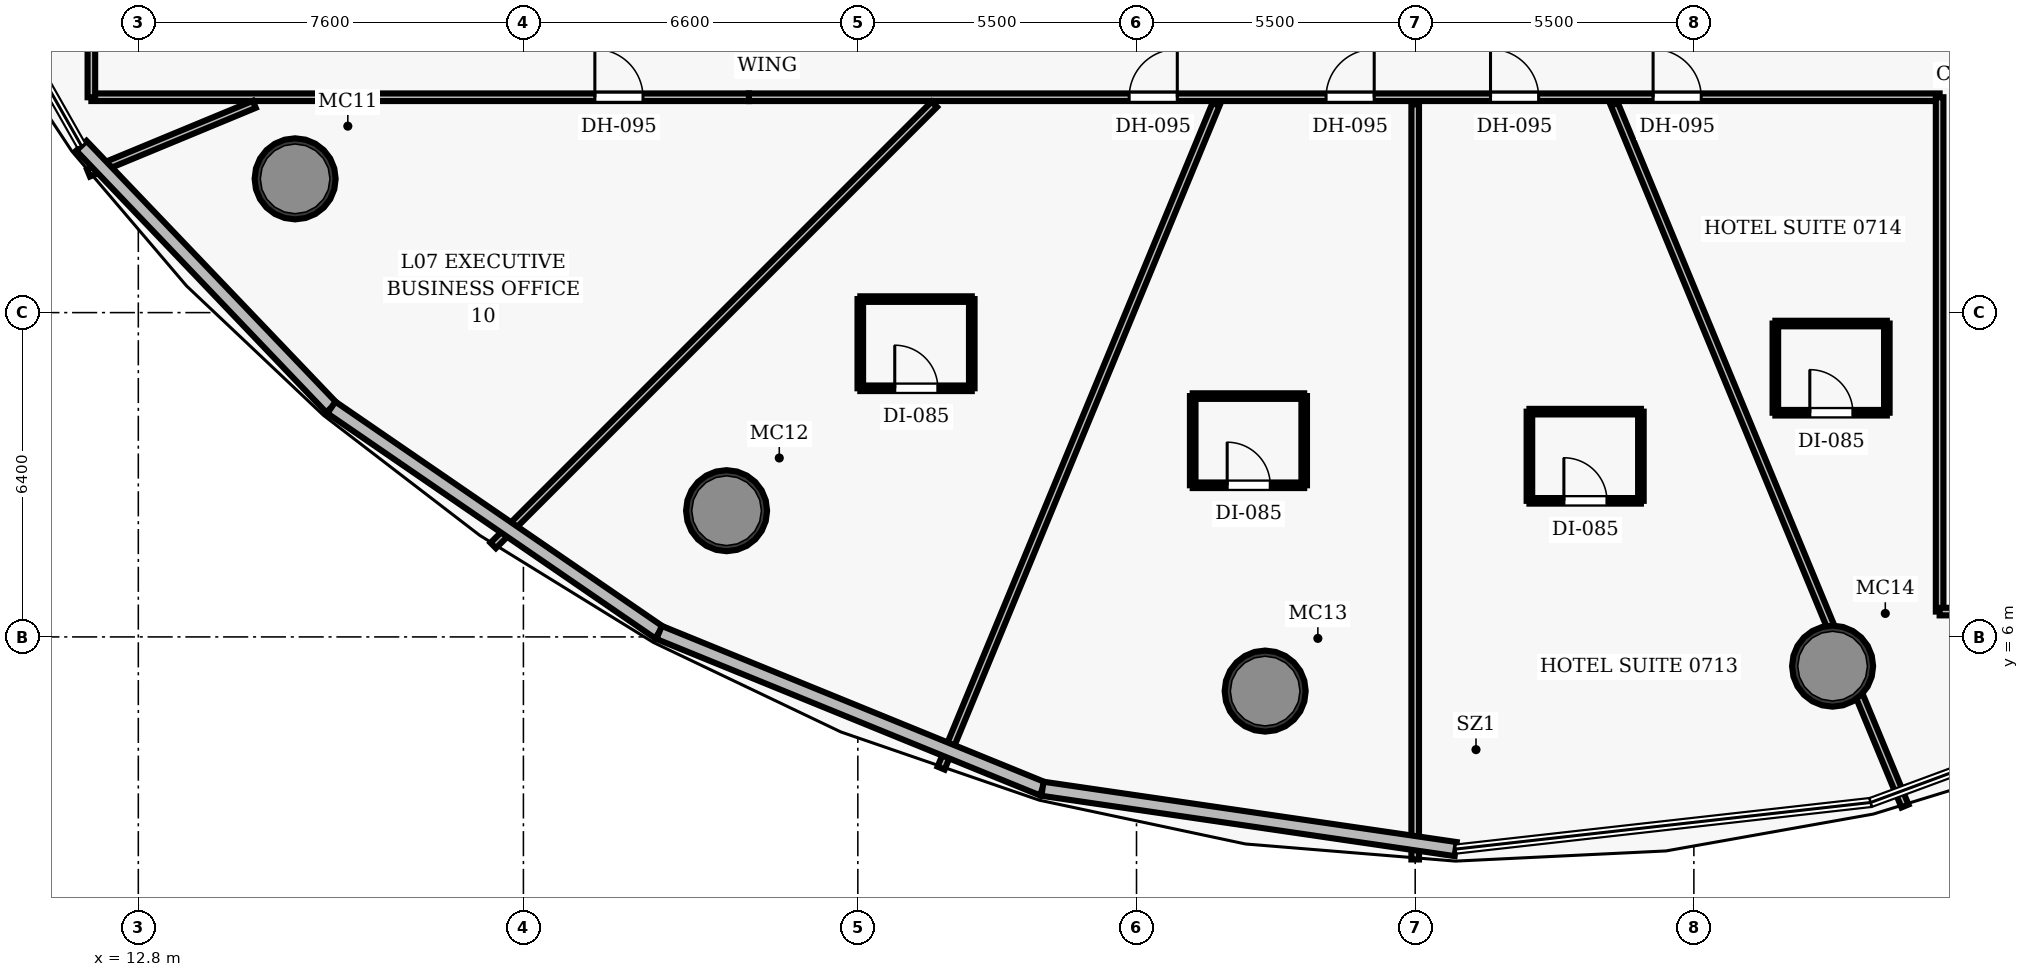
"""IFC4 building model, lengths in metres.
Left out: names, types, materials, properties, quantities, classifications, styles, units other than length and angle.
Written with IfcOpenShell. Run it as: python <this file> out.ifc"""

import sys

from ifc_helpers import new_model, si_unit, direction, frame, frame_2d, origin, origin_2d, place, context, subcontext, project, spatial, rectangle, hollow_circle, extrude, element, fill, save


model = new_model("IFC4")
c1 = context("Model", 3, precision=1e-05, world=origin(), true_north=direction((0.0, 1.0)))
c2 = subcontext(c1, "Body", "Model", "MODEL_VIEW")
j1 = project(units=[si_unit("LENGTHUNIT", "METRE"), si_unit("PLANEANGLEUNIT", "RADIAN")], contexts=[c1])
p1 = place(None, origin())
s1 = spatial("IfcSite", under=j1, at=p1, CompositionType="ELEMENT")
p2 = place(p1, origin())
s2 = spatial("IfcBuilding", under=s1, at=p2, CompositionType="ELEMENT")
p3 = place(p2, frame((0.0, 0.0, 41.4)))
s3 = spatial("IfcBuildingStorey", under=s2, at=p3, CompositionType="ELEMENT", Elevation=41.4)
for number, where, z_axis, x_axis in (
    (1, (15.895, 15.04, 0.0), (0.0, 0.0, 1.0), (1.0, 0.0, 0.0)),
    (2, (24.41, 8.491, 0.0), (0.0, 0.0, 1.0), (1.0, 0.0, 0.0)),
    (3, (35.039, 4.931, 0.0), (0.0, 0.0, 1.0), (1.0, 0.0, 0.0)),
    (4, (46.238, 5.423, 0.0), (0.0, 0.0, 1.0), (1.0, 0.0, 0.0)),
):
    element("IfcColumn", number, at=place(p3, frame(where, z_axis=z_axis, x_axis=x_axis)), inside=s3, PredefinedType="COLUMN", context=c2, shape_type="SweptSolid", body=[
        extrude(hollow_circle(Radius=0.8, WallThickness=0.06, at=origin_2d()), origin(), (0.0, 0.0, 1.0), 3.5),
    ])
p4 = place(p3, frame((24.85, 16.65, 0.0), z_axis=(0.0, 0.0, 1.0), x_axis=(1.0, 0.0, 0.0)))
e5 = element("IfcWall", 5, at=p4, inside=s3, PredefinedType="PARTITIONING", context=c2, shape_type="SweptSolid", body=[
    extrude(rectangle(XDim=23.5, YDim=0.15, at=frame_2d((11.75, 0.0))), origin(), (0.0, 0.0, 1.0), 2.6),
])
p5 = place(p4, frame((7.505, 0.0, 0.0)))
e6 = element("IfcOpeningElement", 6, at=p5, cuts=e5, PredefinedType="OPENING", context=c2, shape_type="SweptSolid", body=[
    extrude(rectangle(XDim=0.95, YDim=2.15, at=frame_2d((0.475, 1.075))), frame((0.0, 0.085, 0.0), z_axis=(0.0, -1.0, 0.0), x_axis=(1.0, 0.0, 0.0)), (0.0, 0.0, 1.0), 0.17),
])
p6 = place(p4, frame((11.391, 0.0, 0.0)))
e7 = element("IfcOpeningElement", 7, at=p6, cuts=e5, PredefinedType="OPENING", context=c2, shape_type="SweptSolid", body=[
    extrude(rectangle(XDim=0.95, YDim=2.15, at=frame_2d((0.475, 1.075))), frame((0.0, 0.085, 0.0), z_axis=(0.0, -1.0, 0.0), x_axis=(1.0, 0.0, 0.0)), (0.0, 0.0, 1.0), 0.17),
])
p7 = place(p4, frame((14.636, 0.0, 0.0)))
e8 = element("IfcOpeningElement", 8, at=p7, cuts=e5, PredefinedType="OPENING", context=c2, shape_type="SweptSolid", body=[
    extrude(rectangle(XDim=0.95, YDim=2.15, at=frame_2d((0.475, 1.075))), frame((0.0, 0.085, 0.0), z_axis=(0.0, -1.0, 0.0), x_axis=(1.0, 0.0, 0.0)), (0.0, 0.0, 1.0), 0.17),
])
p8 = place(p4, frame((17.845, 0.0, 0.0)))
e9 = element("IfcOpeningElement", 9, at=p8, cuts=e5, PredefinedType="OPENING", context=c2, shape_type="SweptSolid", body=[
    extrude(rectangle(XDim=0.95, YDim=2.15, at=frame_2d((0.475, 1.075))), frame((0.0, 0.085, 0.0), z_axis=(0.0, -1.0, 0.0), x_axis=(1.0, 0.0, 0.0)), (0.0, 0.0, 1.0), 0.17),
])
p9 = place(p3, frame((11.874, 16.65, 0.0), z_axis=(0.0, 0.0, 1.0), x_axis=(1.0, 0.0, 0.0)))
e10 = element("IfcWall", 10, at=p9, inside=s3, PredefinedType="PARTITIONING", context=c2, shape_type="SweptSolid", body=[
    extrude(rectangle(XDim=12.977, YDim=0.15, at=frame_2d((6.488, 0.0))), origin(), (0.0, 0.0, 1.0), 2.6),
])
p10 = place(p9, frame((9.937, 0.0, 0.0)))
e11 = element("IfcOpeningElement", 11, at=p10, cuts=e10, PredefinedType="OPENING", context=c2, shape_type="SweptSolid", body=[
    extrude(rectangle(XDim=0.95, YDim=2.15, at=frame_2d((0.475, 1.075))), frame((0.0, 0.085, 0.0), z_axis=(0.0, -1.0, 0.0), x_axis=(1.0, 0.0, 0.0)), (0.0, 0.0, 1.0), 0.17),
])
p11 = place(p3, frame((11.874, 16.65, 0.0), z_axis=(0.0, 0.0, 1.0), x_axis=(0.0, 1.0, 0.0)))
e12 = element("IfcWall", 12, at=p11, inside=s3, PredefinedType="PARTITIONING", context=c2, shape_type="SweptSolid", body=[
    extrude(rectangle(XDim=2.8, YDim=0.15, at=frame_2d((1.4, 0.0))), origin(), (0.0, 0.0, 1.0), 2.6),
])
p12 = place(p3, frame((48.35, 6.5, 0.0), z_axis=(0.0, 0.0, 1.0), x_axis=(0.0, 1.0, 0.0)))
e13 = element("IfcWall", 13, at=p12, inside=s3, PredefinedType="PARTITIONING", context=c2, shape_type="SweptSolid", body=[
    extrude(rectangle(XDim=10.15, YDim=0.15, at=frame_2d((5.075, 0.0))), origin(), (0.0, 0.0, 1.0), 2.6),
])
p13 = place(p3, frame((48.35, 6.5, 0.0), z_axis=(0.0, 0.0, 1.0), x_axis=(1.0, 0.0, 0.0)))
e14 = element("IfcWall", 14, at=p13, inside=s3, PredefinedType="PARTITIONING", context=c2, shape_type="SweptSolid", body=[
    extrude(rectangle(XDim=2.8, YDim=0.15, at=frame_2d((1.4, 0.0))), origin(), (0.0, 0.0, 1.0), 2.6),
])
p14 = place(p3, frame((15.089, 16.51, 0.0), z_axis=(0.0, 0.0, 1.0), x_axis=(-0.923882422403, -0.382676455475, 0.0)))
e15 = element("IfcWall", 15, at=p14, inside=s3, PredefinedType="PARTITIONING", context=c2, shape_type="SweptSolid", body=[
    extrude(rectangle(XDim=3.542, YDim=0.15, at=frame_2d((1.771, 0.0))), origin(), (0.0, 0.0, 1.0), 2.6),
])
p15 = place(p3, frame((28.51, 16.51, 0.0), z_axis=(0.0, 0.0, 1.0), x_axis=(-0.707106781187, -0.707106781187, 0.0)))
e16 = element("IfcWall", 16, at=p15, inside=s3, PredefinedType="PARTITIONING", context=c2, shape_type="SweptSolid", body=[
    extrude(rectangle(XDim=12.312, YDim=0.15, at=frame_2d((6.156, 0.0))), origin(), (0.0, 0.0, 1.0), 2.6),
])
p16 = place(p3, frame((34.069, 16.51, 0.0), z_axis=(0.0, 0.0, 1.0), x_axis=(-0.3826802801, -0.923880838216, 0.0)))
e17 = element("IfcWall", 17, at=p16, inside=s3, PredefinedType="PARTITIONING", context=c2, shape_type="SweptSolid", body=[
    extrude(rectangle(XDim=14.178, YDim=0.15, at=frame_2d((7.089, 0.0))), origin(), (0.0, 0.0, 1.0), 2.6),
])
p17 = place(p3, frame((38.0, 16.51, 0.0), z_axis=(0.0, 0.0, 1.0), x_axis=(0.0, -1.0, 0.0)))
e18 = element("IfcWall", 18, at=p17, inside=s3, PredefinedType="PARTITIONING", context=c2, shape_type="SweptSolid", body=[
    extrude(rectangle(XDim=14.902, YDim=0.15, at=frame_2d((7.451, 0.0))), origin(), (0.0, 0.0, 1.0), 2.6),
])
p18 = place(p3, frame((41.931, 16.51, 0.0), z_axis=(0.0, 0.0, 1.0), x_axis=(0.382684118973, -0.923879248109, 0.0)))
e19 = element("IfcWall", 19, at=p18, inside=s3, PredefinedType="PARTITIONING", context=c2, shape_type="SweptSolid", body=[
    extrude(rectangle(XDim=14.988, YDim=0.15, at=frame_2d((7.494, 0.0))), origin(), (0.0, 0.0, 1.0), 2.6),
])
p19 = place(p3, frame((27.049, 10.907, 0.0), z_axis=(0.0, 0.0, 1.0), x_axis=(1.0, 0.0, 0.0)))
e20 = element("IfcWall", 20, at=p19, inside=s3, PredefinedType="PARTITIONING", context=c2, shape_type="SweptSolid", body=[
    extrude(rectangle(XDim=2.2, YDim=0.11, at=frame_2d((1.1, 0.0))), origin(), (0.0, 0.0, 1.0), 2.6),
])
p20 = place(p19, frame((0.68, 0.0, 0.0)))
e21 = element("IfcOpeningElement", 21, at=p20, cuts=e20, PredefinedType="OPENING", context=c2, shape_type="SweptSolid", body=[
    extrude(rectangle(XDim=0.85, YDim=2.1, at=frame_2d((0.425, 1.05))), frame((0.0, 0.065, 0.0), z_axis=(0.0, -1.0, 0.0), x_axis=(1.0, 0.0, 0.0)), (0.0, 0.0, 1.0), 0.13),
])
p21 = place(p3, frame((27.049, 12.667, 0.0), z_axis=(0.0, 0.0, 1.0), x_axis=(1.0, 0.0, 0.0)))
e22 = element("IfcWall", 22, at=p21, inside=s3, PredefinedType="PARTITIONING", context=c2, shape_type="SweptSolid", body=[
    extrude(rectangle(XDim=2.2, YDim=0.11, at=frame_2d((1.1, 0.0))), origin(), (0.0, 0.0, 1.0), 2.6),
])
for number, where, z_axis, x_axis in (
    (23, (27.049, 10.907, 0.0), (0.0, 0.0, 1.0), (0.0, 1.0, 0.0)),
    (24, (29.249, 10.907, 0.0), (0.0, 0.0, 1.0), (0.0, 1.0, 0.0)),
):
    element("IfcWall", number, at=place(p3, frame(where, z_axis=z_axis, x_axis=x_axis)), inside=s3, PredefinedType="PARTITIONING", context=c2, shape_type="SweptSolid", body=[
        extrude(rectangle(XDim=1.76, YDim=0.11, at=frame_2d((0.88, 0.0))), origin(), (0.0, 0.0, 1.0), 2.6),
    ])
p22 = place(p3, frame((33.609, 8.993, 0.0), z_axis=(0.0, 0.0, 1.0), x_axis=(1.0, 0.0, 0.0)))
e25 = element("IfcWall", 25, at=p22, inside=s3, PredefinedType="PARTITIONING", context=c2, shape_type="SweptSolid", body=[
    extrude(rectangle(XDim=2.2, YDim=0.11, at=frame_2d((1.1, 0.0))), origin(), (0.0, 0.0, 1.0), 2.6),
])
p23 = place(p22, frame((0.68, 0.0, 0.0)))
e26 = element("IfcOpeningElement", 26, at=p23, cuts=e25, PredefinedType="OPENING", context=c2, shape_type="SweptSolid", body=[
    extrude(rectangle(XDim=0.85, YDim=2.1, at=frame_2d((0.425, 1.05))), frame((0.0, 0.065, 0.0), z_axis=(0.0, -1.0, 0.0), x_axis=(1.0, 0.0, 0.0)), (0.0, 0.0, 1.0), 0.13),
])
p24 = place(p3, frame((33.609, 10.753, 0.0), z_axis=(0.0, 0.0, 1.0), x_axis=(1.0, 0.0, 0.0)))
e27 = element("IfcWall", 27, at=p24, inside=s3, PredefinedType="PARTITIONING", context=c2, shape_type="SweptSolid", body=[
    extrude(rectangle(XDim=2.2, YDim=0.11, at=frame_2d((1.1, 0.0))), origin(), (0.0, 0.0, 1.0), 2.6),
])
for number, where, z_axis, x_axis in (
    (28, (33.609, 8.993, 0.0), (0.0, 0.0, 1.0), (0.0, 1.0, 0.0)),
    (29, (35.809, 8.993, 0.0), (0.0, 0.0, 1.0), (0.0, 1.0, 0.0)),
):
    element("IfcWall", number, at=place(p3, frame(where, z_axis=z_axis, x_axis=x_axis)), inside=s3, PredefinedType="PARTITIONING", context=c2, shape_type="SweptSolid", body=[
        extrude(rectangle(XDim=1.76, YDim=0.11, at=frame_2d((0.88, 0.0))), origin(), (0.0, 0.0, 1.0), 2.6),
    ])
p25 = place(p3, frame((40.254, 8.685, 0.0), z_axis=(0.0, 0.0, 1.0), x_axis=(1.0, 0.0, 0.0)))
e30 = element("IfcWall", 30, at=p25, inside=s3, PredefinedType="PARTITIONING", context=c2, shape_type="SweptSolid", body=[
    extrude(rectangle(XDim=2.2, YDim=0.11, at=frame_2d((1.1, 0.0))), origin(), (0.0, 0.0, 1.0), 2.6),
])
p26 = place(p25, frame((0.68, 0.0, 0.0)))
e31 = element("IfcOpeningElement", 31, at=p26, cuts=e30, PredefinedType="OPENING", context=c2, shape_type="SweptSolid", body=[
    extrude(rectangle(XDim=0.85, YDim=2.1, at=frame_2d((0.425, 1.05))), frame((0.0, 0.065, 0.0), z_axis=(0.0, -1.0, 0.0), x_axis=(1.0, 0.0, 0.0)), (0.0, 0.0, 1.0), 0.13),
])
p27 = place(p3, frame((40.254, 10.445, 0.0), z_axis=(0.0, 0.0, 1.0), x_axis=(1.0, 0.0, 0.0)))
e32 = element("IfcWall", 32, at=p27, inside=s3, PredefinedType="PARTITIONING", context=c2, shape_type="SweptSolid", body=[
    extrude(rectangle(XDim=2.2, YDim=0.11, at=frame_2d((1.1, 0.0))), origin(), (0.0, 0.0, 1.0), 2.6),
])
for number, where, z_axis, x_axis in (
    (33, (40.254, 8.685, 0.0), (0.0, 0.0, 1.0), (0.0, 1.0, 0.0)),
    (34, (42.454, 8.685, 0.0), (0.0, 0.0, 1.0), (0.0, 1.0, 0.0)),
):
    element("IfcWall", number, at=place(p3, frame(where, z_axis=z_axis, x_axis=x_axis)), inside=s3, PredefinedType="PARTITIONING", context=c2, shape_type="SweptSolid", body=[
        extrude(rectangle(XDim=1.76, YDim=0.11, at=frame_2d((0.88, 0.0))), origin(), (0.0, 0.0, 1.0), 2.6),
    ])
p28 = place(p3, frame((45.108, 10.424, 0.0), z_axis=(0.0, 0.0, 1.0), x_axis=(1.0, 0.0, 0.0)))
e35 = element("IfcWall", 35, at=p28, inside=s3, PredefinedType="PARTITIONING", context=c2, shape_type="SweptSolid", body=[
    extrude(rectangle(XDim=2.2, YDim=0.11, at=frame_2d((1.1, 0.0))), origin(), (0.0, 0.0, 1.0), 2.6),
])
p29 = place(p28, frame((0.68, 0.0, 0.0)))
e36 = element("IfcOpeningElement", 36, at=p29, cuts=e35, PredefinedType="OPENING", context=c2, shape_type="SweptSolid", body=[
    extrude(rectangle(XDim=0.85, YDim=2.1, at=frame_2d((0.425, 1.05))), frame((0.0, 0.065, 0.0), z_axis=(0.0, -1.0, 0.0), x_axis=(1.0, 0.0, 0.0)), (0.0, 0.0, 1.0), 0.13),
])
p30 = place(p3, frame((45.108, 12.184, 0.0), z_axis=(0.0, 0.0, 1.0), x_axis=(1.0, 0.0, 0.0)))
e37 = element("IfcWall", 37, at=p30, inside=s3, PredefinedType="PARTITIONING", context=c2, shape_type="SweptSolid", body=[
    extrude(rectangle(XDim=2.2, YDim=0.11, at=frame_2d((1.1, 0.0))), origin(), (0.0, 0.0, 1.0), 2.6),
])
for number, where, z_axis, x_axis in (
    (38, (45.108, 10.424, 0.0), (0.0, 0.0, 1.0), (0.0, 1.0, 0.0)),
    (39, (47.308, 10.424, 0.0), (0.0, 0.0, 1.0), (0.0, 1.0, 0.0)),
):
    element("IfcWall", number, at=place(p3, frame(where, z_axis=z_axis, x_axis=x_axis)), inside=s3, PredefinedType="PARTITIONING", context=c2, shape_type="SweptSolid", body=[
        extrude(rectangle(XDim=1.76, YDim=0.11, at=frame_2d((0.88, 0.0))), origin(), (0.0, 0.0, 1.0), 2.6),
    ])
p31 = place(p3, frame((16.61, 10.528, 0.0), z_axis=(0.0, 0.0, 1.0), x_axis=(-0.690719589941, 0.723122706096, 0.0)))
e40 = element("IfcWall", 40, at=p31, inside=s3, PredefinedType="SOLIDWALL", context=c2, shape_type="SweptSolid", body=[
    extrude(rectangle(XDim=7.143, YDim=0.28, at=frame_2d((3.571, 0.0))), origin(), (0.0, 0.0, 1.0), 3.25),
])
p32 = place(p3, frame((23.078, 6.088, 0.0), z_axis=(0.0, 0.0, 1.0), x_axis=(-0.824452139249, 0.565931683234, 0.0)))
e41 = element("IfcWall", 41, at=p32, inside=s3, PredefinedType="SOLIDWALL", context=c2, shape_type="SweptSolid", body=[
    extrude(rectangle(XDim=7.845, YDim=0.28, at=frame_2d((3.922, 0.0))), origin(), (0.0, 0.0, 1.0), 3.25),
])
p33 = place(p3, frame((30.644, 3.004, 0.0), z_axis=(0.0, 0.0, 1.0), x_axis=(-0.926023129378, 0.377466771858, 0.0)))
e42 = element("IfcWall", 42, at=p33, inside=s3, PredefinedType="SOLIDWALL", context=c2, shape_type="SweptSolid", body=[
    extrude(rectangle(XDim=8.171, YDim=0.28, at=frame_2d((4.085, 0.0))), origin(), (0.0, 0.0, 1.0), 3.25),
])
p34 = place(p3, frame((38.799, 1.813, 0.0), z_axis=(0.0, 0.0, 1.0), x_axis=(-0.989508113773, 0.14447730887, 0.0)))
e43 = element("IfcWall", 43, at=p34, inside=s3, PredefinedType="SOLIDWALL", context=c2, shape_type="SweptSolid", body=[
    extrude(rectangle(XDim=8.241, YDim=0.28, at=frame_2d((4.121, 0.0))), origin(), (0.0, 0.0, 1.0), 3.25),
])
p35 = place(p10, origin())
e44 = element("IfcDoor", 44, at=p35, inside=s3, OperationType="SINGLE_SWING_LEFT", PredefinedType="DOOR", context=c2, shape_type="SweptSolid", body=[
    extrude(rectangle(XDim=0.95, YDim=2.15, at=frame_2d((0.475, 1.075))), frame((0.0, 0.025, 0.0), z_axis=(0.0, -1.0, 0.0), x_axis=(1.0, 0.0, 0.0)), (0.0, 0.0, 1.0), 0.05),
])
fill(e11, e44)
p36 = place(p5, origin())
e45 = element("IfcDoor", 45, at=p36, inside=s3, OperationType="SINGLE_SWING_RIGHT", PredefinedType="DOOR", context=c2, shape_type="SweptSolid", body=[
    extrude(rectangle(XDim=0.95, YDim=2.15, at=frame_2d((0.475, 1.075))), frame((0.0, 0.025, 0.0), z_axis=(0.0, -1.0, 0.0), x_axis=(1.0, 0.0, 0.0)), (0.0, 0.0, 1.0), 0.05),
])
fill(e6, e45)
p37 = place(p20, origin())
e46 = element("IfcDoor", 46, at=p37, inside=s3, OperationType="SINGLE_SWING_LEFT", PredefinedType="DOOR", context=c2, shape_type="SweptSolid", body=[
    extrude(rectangle(XDim=0.85, YDim=2.1, at=frame_2d((0.425, 1.05))), frame((0.0, 0.025, 0.0), z_axis=(0.0, -1.0, 0.0), x_axis=(1.0, 0.0, 0.0)), (0.0, 0.0, 1.0), 0.05),
])
fill(e21, e46)
p38 = place(p6, origin())
e47 = element("IfcDoor", 47, at=p38, inside=s3, OperationType="SINGLE_SWING_RIGHT", PredefinedType="DOOR", context=c2, shape_type="SweptSolid", body=[
    extrude(rectangle(XDim=0.95, YDim=2.15, at=frame_2d((0.475, 1.075))), frame((0.0, 0.025, 0.0), z_axis=(0.0, -1.0, 0.0), x_axis=(1.0, 0.0, 0.0)), (0.0, 0.0, 1.0), 0.05),
])
fill(e7, e47)
p39 = place(p23, origin())
e48 = element("IfcDoor", 48, at=p39, inside=s3, OperationType="SINGLE_SWING_LEFT", PredefinedType="DOOR", context=c2, shape_type="SweptSolid", body=[
    extrude(rectangle(XDim=0.85, YDim=2.1, at=frame_2d((0.425, 1.05))), frame((0.0, 0.025, 0.0), z_axis=(0.0, -1.0, 0.0), x_axis=(1.0, 0.0, 0.0)), (0.0, 0.0, 1.0), 0.05),
])
fill(e26, e48)
p40 = place(p7, origin())
e49 = element("IfcDoor", 49, at=p40, inside=s3, OperationType="SINGLE_SWING_LEFT", PredefinedType="DOOR", context=c2, shape_type="SweptSolid", body=[
    extrude(rectangle(XDim=0.95, YDim=2.15, at=frame_2d((0.475, 1.075))), frame((0.0, 0.025, 0.0), z_axis=(0.0, -1.0, 0.0), x_axis=(1.0, 0.0, 0.0)), (0.0, 0.0, 1.0), 0.05),
])
fill(e8, e49)
p41 = place(p26, origin())
e50 = element("IfcDoor", 50, at=p41, inside=s3, OperationType="SINGLE_SWING_LEFT", PredefinedType="DOOR", context=c2, shape_type="SweptSolid", body=[
    extrude(rectangle(XDim=0.85, YDim=2.1, at=frame_2d((0.425, 1.05))), frame((0.0, 0.025, 0.0), z_axis=(0.0, -1.0, 0.0), x_axis=(1.0, 0.0, 0.0)), (0.0, 0.0, 1.0), 0.05),
])
fill(e31, e50)
p42 = place(p8, origin())
e51 = element("IfcDoor", 51, at=p42, inside=s3, OperationType="SINGLE_SWING_LEFT", PredefinedType="DOOR", context=c2, shape_type="SweptSolid", body=[
    extrude(rectangle(XDim=0.95, YDim=2.15, at=frame_2d((0.475, 1.075))), frame((0.0, 0.025, 0.0), z_axis=(0.0, -1.0, 0.0), x_axis=(1.0, 0.0, 0.0)), (0.0, 0.0, 1.0), 0.05),
])
fill(e9, e51)
p43 = place(p29, origin())
e52 = element("IfcDoor", 52, at=p43, inside=s3, OperationType="SINGLE_SWING_LEFT", PredefinedType="DOOR", context=c2, shape_type="SweptSolid", body=[
    extrude(rectangle(XDim=0.85, YDim=2.1, at=frame_2d((0.425, 1.05))), frame((0.0, 0.025, 0.0), z_axis=(0.0, -1.0, 0.0), x_axis=(1.0, 0.0, 0.0)), (0.0, 0.0, 1.0), 0.05),
])
fill(e36, e52)
save(model, sys.argv[1])
